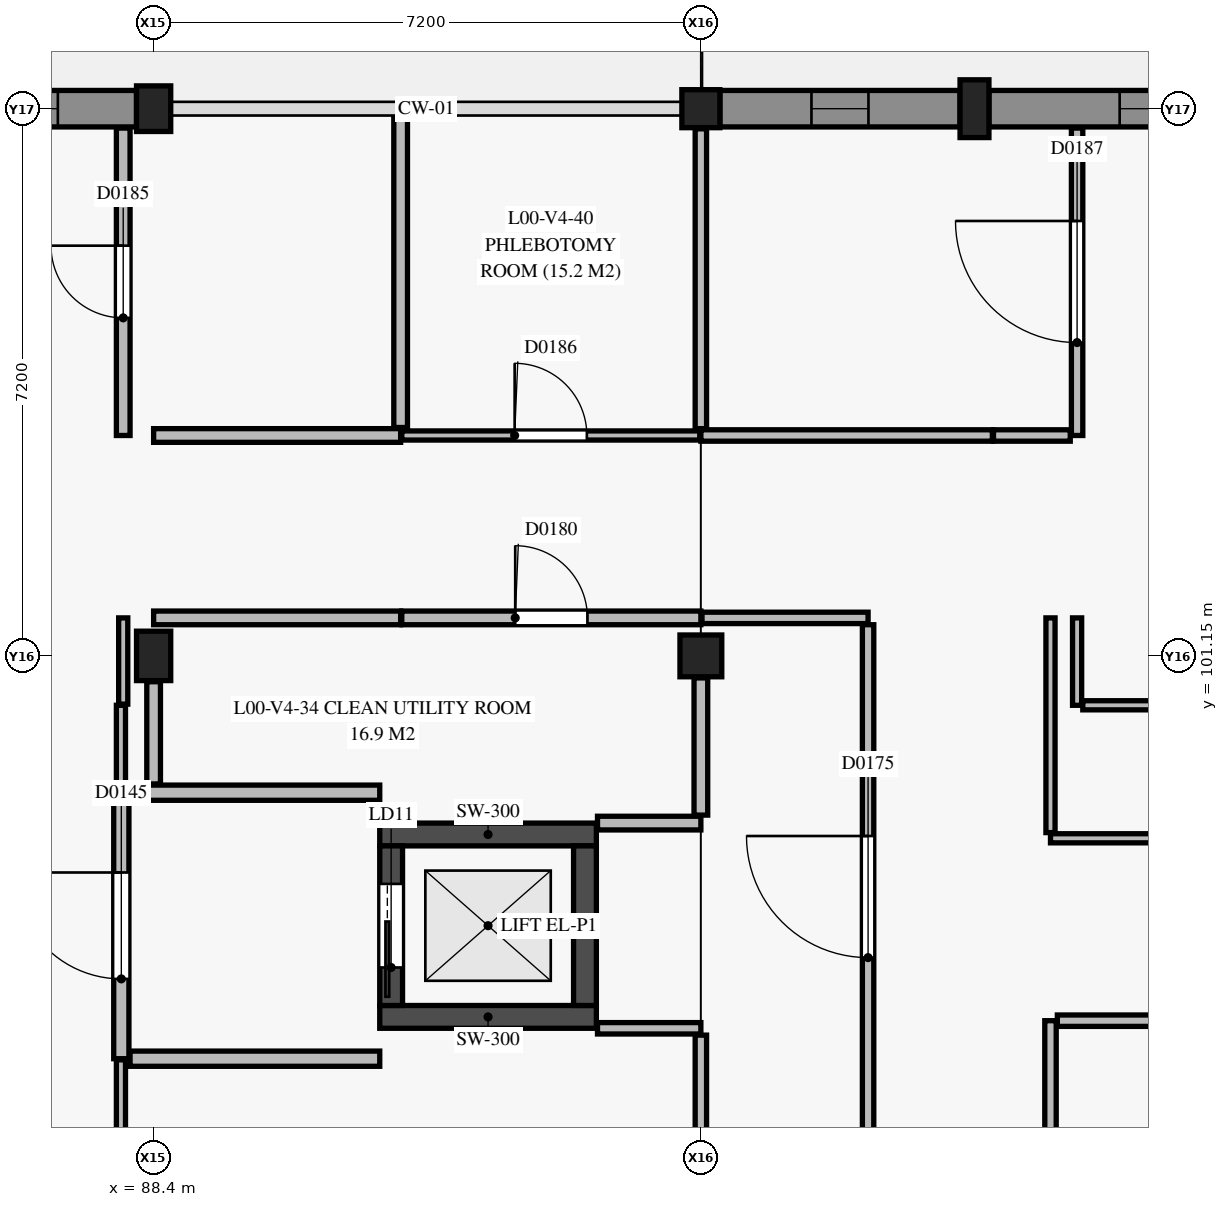
"""IFC4 building model, lengths in metres.
Left out: names, types, materials, properties, quantities, classifications, styles, units other than length and angle.
Written with IfcOpenShell. Run it as: python <this file> out.ifc"""

import sys

from ifc_helpers import new_model, si_unit, direction, frame, frame_2d, origin, origin_2d, place, context, subcontext, project, spatial, rectangle, extrude, element, fill, save


model = new_model("IFC4")
c1 = context("Model", 3, precision=1e-05, world=origin(), true_north=direction((0.0, 1.0)))
c2 = subcontext(c1, "Body", "Model", "MODEL_VIEW")
j1 = project(units=[si_unit("LENGTHUNIT", "METRE"), si_unit("PLANEANGLEUNIT", "RADIAN")], contexts=[c1])
p1 = place(None, origin())
s1 = spatial("IfcSite", under=j1, at=p1, CompositionType="ELEMENT")
p2 = place(p1, origin())
s2 = spatial("IfcBuilding", under=s1, at=p2, CompositionType="ELEMENT")
p3 = place(p2, origin())
s3 = spatial("IfcBuildingStorey", under=s2, at=p3, CompositionType="ELEMENT", Elevation=0.0)
p4 = place(p3, frame((88.4, 101.15, 0.0), z_axis=(0.0, 0.0, 1.0), x_axis=(1.0, 0.0, 0.0)))
e1 = element("IfcColumn", 1, at=p4, inside=s3, PredefinedType="COLUMN", context=c2, shape_type="SweptSolid", body=[
    extrude(rectangle(XDim=0.45, YDim=0.65, at=origin_2d()), origin(), (0.0, 0.0, 1.0), 4.8),
])
p5 = place(p3, frame((88.4, 108.35, 0.0), z_axis=(0.0, 0.0, 1.0), x_axis=(1.0, 0.0, 0.0)))
e2 = element("IfcColumn", 2, at=p5, inside=s3, PredefinedType="COLUMN", context=c2, shape_type="SweptSolid", body=[
    extrude(rectangle(XDim=0.45, YDim=0.6, at=origin_2d()), origin(), (0.0, 0.0, 1.0), 4.8),
])
p6 = place(p3, frame((95.6, 101.15, 0.0), z_axis=(0.0, 0.0, 1.0), x_axis=(1.0, 0.0, 0.0)))
e3 = element("IfcColumn", 3, at=p6, inside=s3, PredefinedType="COLUMN", context=c2, shape_type="SweptSolid", body=[
    extrude(rectangle(XDim=0.55, YDim=0.55, at=origin_2d()), origin(), (0.0, 0.0, 1.0), 4.8),
])
p7 = place(p3, frame((95.6, 108.35, 0.0), z_axis=(0.0, 0.0, 1.0), x_axis=(1.0, 0.0, 0.0)))
e4 = element("IfcColumn", 4, at=p7, inside=s3, PredefinedType="COLUMN", context=c2, shape_type="SweptSolid", body=[
    extrude(rectangle(XDim=0.5, YDim=0.5, at=origin_2d()), origin(), (0.0, 0.0, 1.0), 4.8),
])
p8 = place(p3, frame((99.2, 108.35, 0.0), z_axis=(0.0, 0.0, 1.0), x_axis=(1.0, 0.0, 0.0)))
e5 = element("IfcColumn", 5, at=p8, inside=s3, PredefinedType="PILASTER", context=c2, shape_type="SweptSolid", body=[
    extrude(rectangle(XDim=0.38, YDim=0.76, at=origin_2d()), origin(), (0.0, 0.0, 1.0), 4.8),
])
for number, where, z_axis, x_axis in (
    (6, (91.375, 96.4, 0.0), (0.0, 0.0, 1.0), (1.0, 0.0, 0.0)),
    (7, (91.375, 98.8, 0.0), (0.0, 0.0, 1.0), (1.0, 0.0, 0.0)),
):
    element("IfcWall", number, at=place(p3, frame(where, z_axis=z_axis, x_axis=x_axis)), inside=s3, PredefinedType="SHEAR", context=c2, shape_type="SweptSolid", body=[
        extrude(rectangle(XDim=2.85, YDim=0.3, at=frame_2d((1.425, 0.0))), origin(), (0.0, 0.0, 1.0), 4.55),
    ])
p9 = place(p3, frame((91.525, 96.55, 0.0), z_axis=(0.0, 0.0, 1.0), x_axis=(0.0, 1.0, 0.0)))
e8 = element("IfcWall", 8, at=p9, inside=s3, PredefinedType="SHEAR", context=c2, shape_type="SweptSolid", body=[
    extrude(rectangle(XDim=2.1, YDim=0.3, at=frame_2d((1.05, 0.0))), origin(), (0.0, 0.0, 1.0), 4.55),
])
p10 = place(p9, frame((0.5, 0.0, 0.0)))
e9 = element("IfcOpeningElement", 9, at=p10, cuts=e8, PredefinedType="OPENING", context=c2, shape_type="SweptSolid", body=[
    extrude(rectangle(XDim=1.1, YDim=2.15, at=frame_2d((0.55, 1.075))), frame((0.0, 0.16, 0.0), z_axis=(0.0, -1.0, 0.0), x_axis=(1.0, 0.0, 0.0)), (0.0, 0.0, 1.0), 0.32),
])
p11 = place(p3, frame((94.075, 96.55, 0.0), z_axis=(0.0, 0.0, 1.0), x_axis=(0.0, 1.0, 0.0)))
e10 = element("IfcWall", 10, at=p11, inside=s3, PredefinedType="SHEAR", context=c2, shape_type="SweptSolid", body=[
    extrude(rectangle(XDim=2.1, YDim=0.3, at=frame_2d((1.05, 0.0))), origin(), (0.0, 0.0, 1.0), 4.55),
])
p12 = place(p3, frame((85.7, 108.35, 0.0), z_axis=(0.0, 0.0, 1.0), x_axis=(1.0, 0.0, 0.0)))
e11 = element("IfcWall", 11, at=p12, inside=s3, PredefinedType="SOLIDWALL", context=c2, shape_type="SweptSolid", body=[
    extrude(rectangle(XDim=2.475, YDim=0.48, at=frame_2d((1.238, 0.0))), origin(), (0.0, 0.0, 1.0), 3.73),
])
p13 = place(p12, frame((0.84, 0.0, 0.9)))
e12 = element("IfcOpeningElement", 12, at=p13, cuts=e11, PredefinedType="OPENING", context=c2, shape_type="SweptSolid", body=[
    extrude(rectangle(XDim=0.6, YDim=1.8, at=frame_2d((0.3, 0.9))), frame((0.0, 0.25, 0.0), z_axis=(0.0, -1.0, 0.0), x_axis=(1.0, 0.0, 0.0)), (0.0, 0.0, 1.0), 0.5),
])
p14 = place(p3, frame((95.85, 108.35, 0.0), z_axis=(0.0, 0.0, 1.0), x_axis=(1.0, 0.0, 0.0)))
e13 = element("IfcWall", 13, at=p14, inside=s3, PredefinedType="SOLIDWALL", context=c2, shape_type="SweptSolid", body=[
    extrude(rectangle(XDim=3.16, YDim=0.48, at=frame_2d((1.58, 0.0))), origin(), (0.0, 0.0, 1.0), 3.73),
])
p15 = place(p14, frame((1.205, 0.0, 0.9)))
e14 = element("IfcOpeningElement", 14, at=p15, cuts=e13, PredefinedType="OPENING", context=c2, shape_type="SweptSolid", body=[
    extrude(rectangle(XDim=0.75, YDim=1.8, at=frame_2d((0.375, 0.9))), frame((0.0, 0.25, 0.0), z_axis=(0.0, -1.0, 0.0), x_axis=(1.0, 0.0, 0.0)), (0.0, 0.0, 1.0), 0.5),
])
p16 = place(p3, frame((99.39, 108.35, 0.0), z_axis=(0.0, 0.0, 1.0), x_axis=(1.0, 0.0, 0.0)))
e15 = element("IfcWall", 15, at=p16, inside=s3, PredefinedType="SOLIDWALL", context=c2, shape_type="SweptSolid", body=[
    extrude(rectangle(XDim=3.16, YDim=0.48, at=frame_2d((1.58, 0.0))), origin(), (0.0, 0.0, 1.0), 3.73),
])
p17 = place(p16, frame((1.72, 0.0, 0.9)))
e16 = element("IfcOpeningElement", 16, at=p17, cuts=e15, PredefinedType="OPENING", context=c2, shape_type="SweptSolid", body=[
    extrude(rectangle(XDim=0.9, YDim=1.8, at=frame_2d((0.45, 0.9))), frame((0.0, 0.25, 0.0), z_axis=(0.0, -1.0, 0.0), x_axis=(1.0, 0.0, 0.0)), (0.0, 0.0, 1.0), 0.5),
])
p18 = place(p3, frame((87.975, 95.85, 0.0), z_axis=(0.0, 0.0, 1.0), x_axis=(0.0, 1.0, 0.0)))
e17 = element("IfcWall", 17, at=p18, inside=s3, PredefinedType="PARTITIONING", context=c2, shape_type="SweptSolid", body=[
    extrude(rectangle(XDim=3.5, YDim=0.2, at=frame_2d((1.75, 0.0))), origin(), (0.0, 0.0, 1.0), 4.075),
])
p19 = place(p18, frame((1.05, 0.0, 0.0)))
e18 = element("IfcOpeningElement", 18, at=p19, cuts=e17, PredefinedType="OPENING", context=c2, shape_type="SweptSolid", body=[
    extrude(rectangle(XDim=1.4, YDim=2.2, at=frame_2d((0.7, 1.1))), frame((0.0, 0.11, 0.0), z_axis=(0.0, -1.0, 0.0), x_axis=(1.0, 0.0, 0.0)), (0.0, 0.0, 1.0), 0.22),
])
for number, where, z_axis, x_axis in (
    (19, (88.09, 99.35, 0.0), (0.0, 0.0, 1.0), (1.0, 0.0, 0.0)),
    (20, (88.09, 95.85, 0.0), (0.0, 0.0, 1.0), (1.0, 0.0, 0.0)),
):
    element("IfcWall", number, at=place(p3, frame(where, z_axis=z_axis, x_axis=x_axis)), inside=s3, PredefinedType="PARTITIONING", context=c2, shape_type="SweptSolid", body=[
        extrude(rectangle(XDim=3.285, YDim=0.2, at=frame_2d((1.643, 0.0))), origin(), (0.0, 0.0, 1.0), 4.015),
    ])
p20 = place(p3, frame((88.4, 101.65, 0.0), z_axis=(0.0, 0.0, 1.0), x_axis=(1.0, 0.0, 0.0)))
e21 = element("IfcWall", 21, at=p20, inside=s3, PredefinedType="PLUMBINGWALL", context=c2, shape_type="SweptSolid", body=[
    extrude(rectangle(XDim=3.25, YDim=0.18, at=frame_2d((1.625, 0.0))), origin(), (0.0, 0.0, 1.0), 4.055),
])
p21 = place(p3, frame((91.665, 101.65, 0.0), z_axis=(0.0, 0.0, 1.0), x_axis=(1.0, 0.0, 0.0)))
e22 = element("IfcWall", 22, at=p21, inside=s3, PredefinedType="PLUMBINGWALL", context=c2, shape_type="SweptSolid", body=[
    extrude(rectangle(XDim=3.935, YDim=0.18, at=frame_2d((1.968, 0.0))), origin(), (0.0, 0.0, 1.0), 3.885),
])
p22 = place(p21, frame((1.492, 0.0, 0.0)))
e23 = element("IfcOpeningElement", 23, at=p22, cuts=e22, PredefinedType="OPENING", context=c2, shape_type="SweptSolid", body=[
    extrude(rectangle(XDim=0.95, YDim=2.1, at=frame_2d((0.475, 1.05))), frame((0.0, 0.1, 0.0), z_axis=(0.0, -1.0, 0.0), x_axis=(1.0, 0.0, 0.0)), (0.0, 0.0, 1.0), 0.2),
])
p23 = place(p3, frame((88.0, 104.05, 0.0), z_axis=(0.0, 0.0, 1.0), x_axis=(0.0, 1.0, 0.0)))
e24 = element("IfcWall", 24, at=p23, inside=s3, PredefinedType="PLUMBINGWALL", context=c2, shape_type="SweptSolid", body=[
    extrude(rectangle(XDim=4.045, YDim=0.18, at=frame_2d((2.022, 0.0))), origin(), (0.0, 0.0, 1.0), 4.55),
])
p24 = place(p23, frame((1.548, 0.0, 0.0)))
e25 = element("IfcOpeningElement", 25, at=p24, cuts=e24, PredefinedType="OPENING", context=c2, shape_type="SweptSolid", body=[
    extrude(rectangle(XDim=0.95, YDim=2.1, at=frame_2d((0.475, 1.05))), frame((0.0, 0.1, 0.0), z_axis=(0.0, -1.0, 0.0), x_axis=(1.0, 0.0, 0.0)), (0.0, 0.0, 1.0), 0.2),
])
p25 = place(p3, frame((88.4, 104.05, 0.0), z_axis=(0.0, 0.0, 1.0), x_axis=(1.0, 0.0, 0.0)))
e26 = element("IfcWall", 26, at=p25, inside=s3, PredefinedType="PLUMBINGWALL", context=c2, shape_type="SweptSolid", body=[
    extrude(rectangle(XDim=3.25, YDim=0.18, at=frame_2d((1.625, 0.0))), origin(), (0.0, 0.0, 1.0), 4.055),
])
p26 = place(p3, frame((95.615, 101.65, 0.0), z_axis=(0.0, 0.0, 1.0), x_axis=(1.0, 0.0, 0.0)))
e27 = element("IfcWall", 27, at=p26, inside=s3, PredefinedType="PARTITIONING", context=c2, shape_type="SweptSolid", body=[
    extrude(rectangle(XDim=2.185, YDim=0.15, at=frame_2d((1.093, 0.0))), origin(), (0.0, 0.0, 1.0), 3.885),
])
p27 = place(p3, frame((97.8, 94.4, 0.0), z_axis=(0.0, 0.0, 1.0), x_axis=(0.0, 1.0, 0.0)))
e28 = element("IfcWall", 28, at=p27, inside=s3, PredefinedType="PARTITIONING", context=c2, shape_type="SweptSolid", body=[
    extrude(rectangle(XDim=7.16, YDim=0.15, at=frame_2d((3.58, 0.0))), origin(), (0.0, 0.0, 1.0), 3.955),
])
p28 = place(p27, frame((2.78, 0.0, 0.0)))
e29 = element("IfcOpeningElement", 29, at=p28, cuts=e28, PredefinedType="OPENING", context=c2, shape_type="SweptSolid", body=[
    extrude(rectangle(XDim=1.6, YDim=2.25, at=frame_2d((0.8, 1.125))), frame((0.0, 0.085, 0.0), z_axis=(0.0, -1.0, 0.0), x_axis=(1.0, 0.0, 0.0)), (0.0, 0.0, 1.0), 0.17),
])
p29 = place(p3, frame((100.2, 94.49, 0.0), z_axis=(0.0, 0.0, 1.0), x_axis=(0.0, 1.0, 0.0)))
e30 = element("IfcWall", 30, at=p29, inside=s3, PredefinedType="PARTITIONING", context=c2, shape_type="SweptSolid", body=[
    extrude(rectangle(XDim=1.86, YDim=0.15, at=frame_2d((0.93, 0.0))), origin(), (0.0, 0.0, 1.0), 4.075),
])
p30 = place(p3, frame((100.29, 96.35, 0.0), z_axis=(0.0, 0.0, 1.0), x_axis=(1.0, 0.0, 0.0)))
e31 = element("IfcWall", 31, at=p30, inside=s3, PredefinedType="PARTITIONING", context=c2, shape_type="SweptSolid", body=[
    extrude(rectangle(XDim=1.71, YDim=0.15, at=frame_2d((0.855, 0.0))), origin(), (0.0, 0.0, 1.0), 4.075),
])
p31 = place(p3, frame((100.55, 104.05, 0.0), z_axis=(0.0, 0.0, 1.0), x_axis=(0.0, 1.0, 0.0)))
e32 = element("IfcWall", 32, at=p31, inside=s3, PredefinedType="PARTITIONING", context=c2, shape_type="SweptSolid", body=[
    extrude(rectangle(XDim=4.045, YDim=0.15, at=frame_2d((2.022, 0.0))), origin(), (0.0, 0.0, 1.0), 4.075),
])
p32 = place(p31, frame((1.222, 0.0, 0.0)))
e33 = element("IfcOpeningElement", 33, at=p32, cuts=e32, PredefinedType="OPENING", context=c2, shape_type="SweptSolid", body=[
    extrude(rectangle(XDim=1.6, YDim=2.25, at=frame_2d((0.8, 1.125))), frame((0.0, 0.085, 0.0), z_axis=(0.0, -1.0, 0.0), x_axis=(1.0, 0.0, 0.0)), (0.0, 0.0, 1.0), 0.17),
])
p33 = place(p3, frame((99.45, 104.05, 0.0), z_axis=(0.0, 0.0, 1.0), x_axis=(1.0, 0.0, 0.0)))
e34 = element("IfcWall", 34, at=p33, inside=s3, PredefinedType="PARTITIONING", context=c2, shape_type="SweptSolid", body=[
    extrude(rectangle(XDim=1.01, YDim=0.15, at=frame_2d((0.505, 0.0))), origin(), (0.0, 0.0, 1.0), 4.55),
])
p34 = place(p3, frame((95.6, 104.05, 0.0), z_axis=(0.0, 0.0, 1.0), x_axis=(1.0, 0.0, 0.0)))
e35 = element("IfcWall", 35, at=p34, inside=s3, PredefinedType="PARTITIONING", context=c2, shape_type="SweptSolid", body=[
    extrude(rectangle(XDim=3.835, YDim=0.15, at=frame_2d((1.917, 0.0))), origin(), (0.0, 0.0, 1.0), 3.885),
])
p35 = place(p3, frame((87.97, 78.75, 0.0), z_axis=(0.0, 0.0, 1.0), x_axis=(0.0, 1.0, 0.0)))
e36 = element("IfcWall", 36, at=p35, inside=s3, PredefinedType="PARTITIONING", context=c2, shape_type="SweptSolid", body=[
    extrude(rectangle(XDim=17.085, YDim=0.12, at=frame_2d((8.542, 0.0))), origin(), (0.0, 0.0, 1.0), 3.815),
])
p36 = place(p35, frame((5.452, 0.0, 0.0)))
e37 = element("IfcOpeningElement", 37, at=p36, cuts=e36, PredefinedType="OPENING", context=c2, shape_type="SweptSolid", body=[
    extrude(rectangle(XDim=1.05, YDim=2.15, at=frame_2d((0.525, 1.075))), frame((0.0, 0.07, 0.0), z_axis=(0.0, -1.0, 0.0), x_axis=(1.0, 0.0, 0.0)), (0.0, 0.0, 1.0), 0.14),
])
for number, where, z_axis, x_axis in (
    (38, (87.97, 99.365, 0.0), (0.0, 0.0, 1.0), (0.0, 1.0, 0.0)),
    (39, (88.0, 100.515, 0.0), (0.0, 0.0, 1.0), (0.0, 1.0, 0.0)),
):
    element("IfcWall", number, at=place(p3, frame(where, z_axis=z_axis, x_axis=x_axis)), inside=s3, PredefinedType="PARTITIONING", context=c2, shape_type="SweptSolid", body=[
        extrude(rectangle(XDim=1.135, YDim=0.12, at=frame_2d((0.567, 0.0))), origin(), (0.0, 0.0, 1.0), 4.55),
    ])
p37 = place(p3, frame((100.55, 100.5, 0.0), z_axis=(0.0, 0.0, 1.0), x_axis=(0.0, 1.0, 0.0)))
e40 = element("IfcWall", 40, at=p37, inside=s3, PredefinedType="PARTITIONING", context=c2, shape_type="SweptSolid", body=[
    extrude(rectangle(XDim=1.15, YDim=0.12, at=frame_2d((0.575, 0.0))), origin(), (0.0, 0.0, 1.0), 3.955),
])
p38 = place(p3, frame((100.625, 100.5, 0.0), z_axis=(0.0, 0.0, 1.0), x_axis=(1.0, 0.0, 0.0)))
e41 = element("IfcWall", 41, at=p38, inside=s3, PredefinedType="PARTITIONING", context=c2, shape_type="SweptSolid", body=[
    extrude(rectangle(XDim=2.175, YDim=0.12, at=frame_2d((1.087, 0.0))), origin(), (0.0, 0.0, 1.0), 4.015),
])
p39 = place(p3, frame((100.2, 98.75, 0.0), z_axis=(0.0, 0.0, 1.0), x_axis=(1.0, 0.0, 0.0)))
e42 = element("IfcWall", 42, at=p39, inside=s3, PredefinedType="PARTITIONING", context=c2, shape_type="SweptSolid", body=[
    extrude(rectangle(XDim=2.585, YDim=0.12, at=frame_2d((1.292, 0.0))), origin(), (0.0, 0.0, 1.0), 4.015),
])
p40 = place(p3, frame((100.2, 98.825, 0.0), z_axis=(0.0, 0.0, 1.0), x_axis=(0.0, 1.0, 0.0)))
e43 = element("IfcWall", 43, at=p40, inside=s3, PredefinedType="PARTITIONING", context=c2, shape_type="SweptSolid", body=[
    extrude(rectangle(XDim=2.825, YDim=0.12, at=frame_2d((1.413, 0.0))), origin(), (0.0, 0.0, 1.0), 3.955),
])
p41 = place(p3, frame((91.665, 104.05, 0.0), z_axis=(0.0, 0.0, 1.0), x_axis=(1.0, 0.0, 0.0)))
e44 = element("IfcWall", 44, at=p41, inside=s3, PredefinedType="PARTITIONING", context=c2, shape_type="SweptSolid", body=[
    extrude(rectangle(XDim=3.92, YDim=0.12, at=frame_2d((1.96, 0.0))), origin(), (0.0, 0.0, 1.0), 3.885),
])
p42 = place(p41, frame((1.485, 0.0, 0.0)))
e45 = element("IfcOpeningElement", 45, at=p42, cuts=e44, PredefinedType="OPENING", context=c2, shape_type="SweptSolid", body=[
    extrude(rectangle(XDim=0.95, YDim=2.1, at=frame_2d((0.475, 1.05))), frame((0.0, 0.07, 0.0), z_axis=(0.0, -1.0, 0.0), x_axis=(1.0, 0.0, 0.0)), (0.0, 0.0, 1.0), 0.14),
])
p43 = place(p3, frame((88.4, 99.465, 0.0), z_axis=(0.0, 0.0, 1.0), x_axis=(0.0, 1.0, 0.0)))
e46 = element("IfcWall", 46, at=p43, inside=s3, PredefinedType="PLUMBINGWALL", context=c2, shape_type="SweptSolid", body=[
    extrude(rectangle(XDim=1.345, YDim=0.18, at=frame_2d((0.672, 0.0))), origin(), (0.0, 0.0, 1.0), 4.015),
])
p44 = place(p3, frame((94.24, 98.95, 0.0), z_axis=(0.0, 0.0, 1.0), x_axis=(1.0, 0.0, 0.0)))
e47 = element("IfcWall", 47, at=p44, inside=s3, PredefinedType="PLUMBINGWALL", context=c2, shape_type="SweptSolid", body=[
    extrude(rectangle(XDim=1.36, YDim=0.18, at=frame_2d((0.68, 0.0))), origin(), (0.0, 0.0, 1.0), 3.885),
])
p45 = place(p3, frame((95.6, 99.055, 0.0), z_axis=(0.0, 0.0, 1.0), x_axis=(0.0, 1.0, 0.0)))
e48 = element("IfcWall", 48, at=p45, inside=s3, PredefinedType="PLUMBINGWALL", context=c2, shape_type="SweptSolid", body=[
    extrude(rectangle(XDim=1.805, YDim=0.18, at=frame_2d((0.903, 0.0))), origin(), (0.0, 0.0, 1.0), 3.885),
])
p46 = place(p3, frame((91.65, 104.155, 0.0), z_axis=(0.0, 0.0, 1.0), x_axis=(0.0, 1.0, 0.0)))
e49 = element("IfcWall", 49, at=p46, inside=s3, PredefinedType="PLUMBINGWALL", context=c2, shape_type="SweptSolid", body=[
    extrude(rectangle(XDim=4.09, YDim=0.18, at=frame_2d((2.045, 0.0))), origin(), (0.0, 0.0, 1.0), 4.115),
])
p47 = place(p3, frame((94.24, 96.25, 0.0), z_axis=(0.0, 0.0, 1.0), x_axis=(1.0, 0.0, 0.0)))
e50 = element("IfcWall", 50, at=p47, inside=s3, PredefinedType="PARTITIONING", context=c2, shape_type="SweptSolid", body=[
    extrude(rectangle(XDim=1.36, YDim=0.15, at=frame_2d((0.68, 0.0))), origin(), (0.0, 0.0, 1.0), 3.885),
])
p48 = place(p3, frame((95.6, 94.265, 0.0), z_axis=(0.0, 0.0, 1.0), x_axis=(0.0, 1.0, 0.0)))
e51 = element("IfcWall", 51, at=p48, inside=s3, PredefinedType="PARTITIONING", context=c2, shape_type="SweptSolid", body=[
    extrude(rectangle(XDim=1.895, YDim=0.15, at=frame_2d((0.948, 0.0))), origin(), (0.0, 0.0, 1.0), 3.885),
])
p49 = place(p3, frame((95.6, 104.14, 0.0), z_axis=(0.0, 0.0, 1.0), x_axis=(0.0, 1.0, 0.0)))
e52 = element("IfcWall", 52, at=p49, inside=s3, PredefinedType="PARTITIONING", context=c2, shape_type="SweptSolid", body=[
    extrude(rectangle(XDim=3.945, YDim=0.15, at=frame_2d((1.973, 0.0))), origin(), (0.0, 0.0, 1.0), 3.885),
])
p50 = place(p13, origin())
e53 = element("IfcWindow", 53, at=p50, inside=s3, PartitioningType="SINGLE_PANEL", PredefinedType="WINDOW", context=c2, shape_type="SweptSolid", body=[
    extrude(rectangle(XDim=0.6, YDim=1.8, at=frame_2d((0.3, 0.9))), frame((0.0, 0.03, 0.0), z_axis=(0.0, -1.0, 0.0), x_axis=(1.0, 0.0, 0.0)), (0.0, 0.0, 1.0), 0.06),
])
fill(e12, e53)
p51 = place(p15, origin())
e54 = element("IfcWindow", 54, at=p51, inside=s3, PartitioningType="SINGLE_PANEL", PredefinedType="WINDOW", context=c2, shape_type="SweptSolid", body=[
    extrude(rectangle(XDim=0.75, YDim=1.8, at=frame_2d((0.375, 0.9))), frame((0.0, 0.03, 0.0), z_axis=(0.0, -1.0, 0.0), x_axis=(1.0, 0.0, 0.0)), (0.0, 0.0, 1.0), 0.06),
])
fill(e14, e54)
p52 = place(p17, origin())
e55 = element("IfcWindow", 55, at=p52, inside=s3, PartitioningType="SINGLE_PANEL", PredefinedType="WINDOW", context=c2, shape_type="SweptSolid", body=[
    extrude(rectangle(XDim=0.9, YDim=1.8, at=frame_2d((0.45, 0.9))), frame((0.0, 0.03, 0.0), z_axis=(0.0, -1.0, 0.0), x_axis=(1.0, 0.0, 0.0)), (0.0, 0.0, 1.0), 0.06),
])
fill(e16, e55)
p53 = place(p10, origin())
e56 = element("IfcDoor", 56, at=p53, inside=s3, OperationType="SLIDING_TO_LEFT", PredefinedType="DOOR", context=c2, shape_type="SweptSolid", body=[
    extrude(rectangle(XDim=1.1, YDim=2.15, at=frame_2d((0.55, 1.075))), frame((0.0, 0.025, 0.0), z_axis=(0.0, -1.0, 0.0), x_axis=(1.0, 0.0, 0.0)), (0.0, 0.0, 1.0), 0.05),
])
fill(e9, e56)
p54 = place(p19, origin())
e57 = element("IfcDoor", 57, at=p54, inside=s3, OperationType="SINGLE_SWING_RIGHT", PredefinedType="DOOR", context=c2, shape_type="SweptSolid", body=[
    extrude(rectangle(XDim=1.4, YDim=2.2, at=frame_2d((0.7, 1.1))), frame((0.0, 0.025, 0.0), z_axis=(0.0, -1.0, 0.0), x_axis=(1.0, 0.0, 0.0)), (0.0, 0.0, 1.0), 0.05),
])
fill(e18, e57)
p55 = place(p28, origin())
e58 = element("IfcDoor", 58, at=p55, inside=s3, OperationType="SINGLE_SWING_RIGHT", PredefinedType="DOOR", context=c2, shape_type="SweptSolid", body=[
    extrude(rectangle(XDim=1.6, YDim=2.25, at=frame_2d((0.8, 1.125))), frame((0.0, 0.025, 0.0), z_axis=(0.0, -1.0, 0.0), x_axis=(1.0, 0.0, 0.0)), (0.0, 0.0, 1.0), 0.05),
])
fill(e29, e58)
p56 = place(p22, origin())
e59 = element("IfcDoor", 59, at=p56, inside=s3, OperationType="SINGLE_SWING_LEFT", PredefinedType="DOOR", context=c2, shape_type="SweptSolid", body=[
    extrude(rectangle(XDim=0.95, YDim=2.1, at=frame_2d((0.475, 1.05))), frame((0.0, 0.025, 0.0), z_axis=(0.0, -1.0, 0.0), x_axis=(1.0, 0.0, 0.0)), (0.0, 0.0, 1.0), 0.05),
])
fill(e23, e59)
p57 = place(p24, origin())
e60 = element("IfcDoor", 60, at=p57, inside=s3, OperationType="SINGLE_SWING_RIGHT", PredefinedType="DOOR", context=c2, shape_type="SweptSolid", body=[
    extrude(rectangle(XDim=0.95, YDim=2.1, at=frame_2d((0.475, 1.05))), frame((0.0, 0.025, 0.0), z_axis=(0.0, -1.0, 0.0), x_axis=(1.0, 0.0, 0.0)), (0.0, 0.0, 1.0), 0.05),
])
fill(e25, e60)
p58 = place(p42, origin())
e61 = element("IfcDoor", 61, at=p58, inside=s3, OperationType="SINGLE_SWING_LEFT", PredefinedType="DOOR", context=c2, shape_type="SweptSolid", body=[
    extrude(rectangle(XDim=0.95, YDim=2.1, at=frame_2d((0.475, 1.05))), frame((0.0, 0.025, 0.0), z_axis=(0.0, -1.0, 0.0), x_axis=(1.0, 0.0, 0.0)), (0.0, 0.0, 1.0), 0.05),
])
fill(e45, e61)
p59 = place(p32, origin())
e62 = element("IfcDoor", 62, at=p59, inside=s3, OperationType="SINGLE_SWING_RIGHT", PredefinedType="DOOR", context=c2, shape_type="SweptSolid", body=[
    extrude(rectangle(XDim=1.6, YDim=2.25, at=frame_2d((0.8, 1.125))), frame((0.0, 0.025, 0.0), z_axis=(0.0, -1.0, 0.0), x_axis=(1.0, 0.0, 0.0)), (0.0, 0.0, 1.0), 0.05),
])
fill(e33, e62)
save(model, sys.argv[1])
